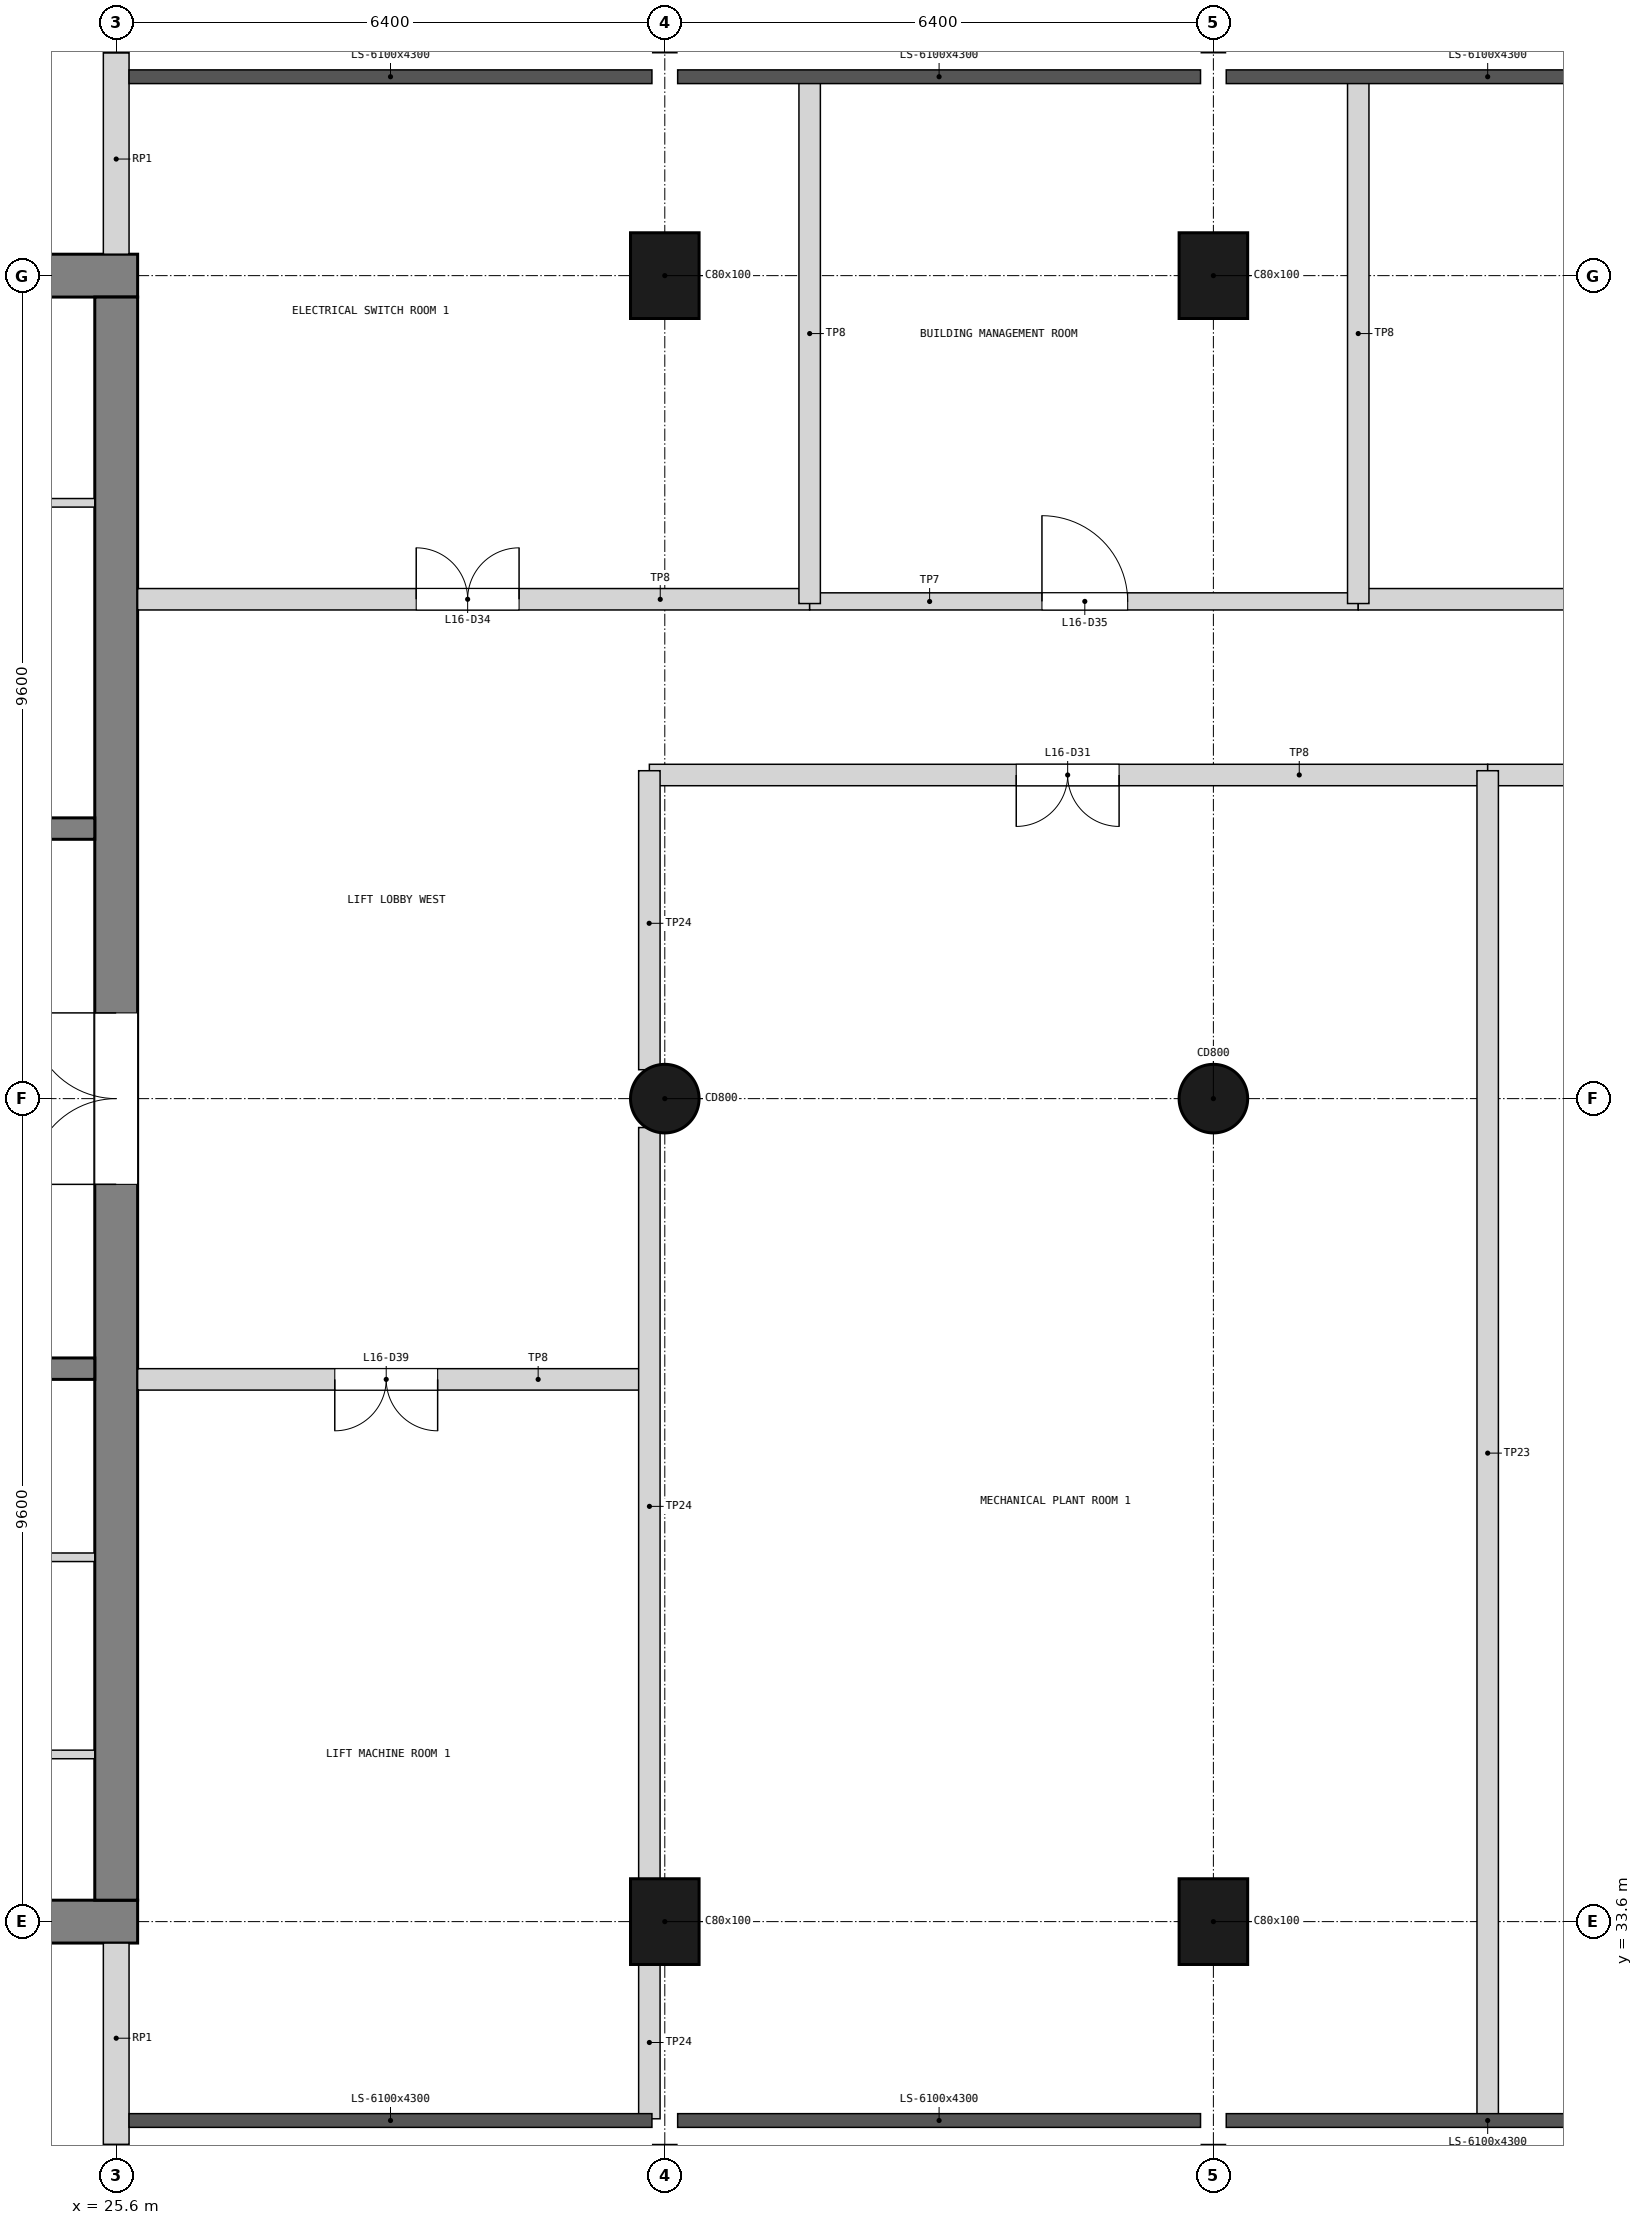
"""IFC4 building model, lengths in metres.
Left out: names, types, materials, properties, quantities, classifications, styles, units other than length and angle.
Written with IfcOpenShell. Run it as: python <this file> out.ifc"""

import sys

from ifc_helpers import new_model, si_unit, direction, frame, frame_2d, origin, origin_2d, place, context, subcontext, project, spatial, rectangle, circle, extrude, element, fill, save


model = new_model("IFC4")
c1 = context("Model", 3, precision=1e-05, world=origin(), true_north=direction((0.0, 1.0)))
c2 = subcontext(c1, "Body", "Model", "MODEL_VIEW")
j1 = project(units=[si_unit("LENGTHUNIT", "METRE"), si_unit("PLANEANGLEUNIT", "RADIAN")], contexts=[c1])
p1 = place(None, origin())
s1 = spatial("IfcSite", under=j1, at=p1, CompositionType="ELEMENT")
p2 = place(p1, origin())
s2 = spatial("IfcBuilding", under=s1, at=p2, CompositionType="ELEMENT")
p3 = place(p2, frame((0.0, 0.0, 64.2)))
s3 = spatial("IfcBuildingStorey", under=s2, at=p3, CompositionType="ELEMENT", Elevation=64.2)
p4 = place(p3, frame((12.55, 52.8, 0.0), z_axis=(0.0, 0.0, 1.0), x_axis=(1.0, 0.0, 0.0)))
e1 = element("IfcWall", 1, at=p4, inside=s3, PredefinedType="SHEAR", context=c2, shape_type="SweptSolid", body=[
    extrude(rectangle(XDim=13.3, YDim=0.5, at=frame_2d((6.65, 0.0))), origin(), (0.0, 0.0, 1.0), 5.1),
])
p5 = place(p4, frame((1.85, 0.0, 1.0)))
e2 = element("IfcOpeningElement", 2, at=p5, cuts=e1, PredefinedType="OPENING", context=c2, shape_type="SweptSolid", body=[
    extrude(rectangle(XDim=0.4, YDim=2.0, at=frame_2d((0.2, 1.0))), frame((0.0, 0.26, 0.0), z_axis=(0.0, -1.0, 0.0), x_axis=(1.0, 0.0, 0.0)), (0.0, 0.0, 1.0), 0.52),
])
p6 = place(p3, frame((12.55, 33.6, 0.0), z_axis=(0.0, 0.0, 1.0), x_axis=(1.0, 0.0, 0.0)))
e3 = element("IfcWall", 3, at=p6, inside=s3, PredefinedType="SHEAR", context=c2, shape_type="SweptSolid", body=[
    extrude(rectangle(XDim=13.3, YDim=0.5, at=frame_2d((6.65, 0.0))), origin(), (0.0, 0.0, 1.0), 5.1),
])
p7 = place(p6, frame((1.85, 0.0, 1.0)))
e4 = element("IfcOpeningElement", 4, at=p7, cuts=e3, PredefinedType="OPENING", context=c2, shape_type="SweptSolid", body=[
    extrude(rectangle(XDim=0.4, YDim=2.0, at=frame_2d((0.2, 1.0))), frame((0.0, 0.26, 0.0), z_axis=(0.0, -1.0, 0.0), x_axis=(1.0, 0.0, 0.0)), (0.0, 0.0, 1.0), 0.52),
])
p8 = place(p3, frame((25.6, 33.85, 0.0), z_axis=(0.0, 0.0, 1.0), x_axis=(0.0, 1.0, 0.0)))
e5 = element("IfcWall", 5, at=p8, inside=s3, PredefinedType="SHEAR", context=c2, shape_type="SweptSolid", body=[
    extrude(rectangle(XDim=18.7, YDim=0.5, at=frame_2d((9.35, 0.0))), origin(), (0.0, 0.0, 1.0), 5.1),
])
p9 = place(p8, frame((8.35, 0.0, 0.0)))
e6 = element("IfcOpeningElement", 6, at=p9, cuts=e5, PredefinedType="OPENING", context=c2, shape_type="SweptSolid", body=[
    extrude(rectangle(XDim=2.0, YDim=2.1, at=frame_2d((1.0, 1.05))), frame((0.0, 0.26, 0.0), z_axis=(0.0, -1.0, 0.0), x_axis=(1.0, 0.0, 0.0)), (0.0, 0.0, 1.0), 0.52),
])
p10 = place(p3, frame((32.0, 33.6, 0.0), z_axis=(0.0, 0.0, 1.0), x_axis=(1.0, 0.0, 0.0)))
e7 = element("IfcColumn", 7, at=p10, inside=s3, PredefinedType="COLUMN", context=c2, shape_type="SweptSolid", body=[
    extrude(rectangle(XDim=0.8, YDim=1.0, at=origin_2d()), origin(), (0.0, 0.0, 1.0), 5.4),
])
p11 = place(p3, frame((32.0, 43.2, 0.0), z_axis=(0.0, 0.0, 1.0), x_axis=(1.0, 0.0, 0.0)))
e8 = element("IfcColumn", 8, at=p11, inside=s3, PredefinedType="COLUMN", context=c2, shape_type="SweptSolid", body=[
    extrude(circle(Radius=0.4, at=origin_2d()), origin(), (0.0, 0.0, 1.0), 5.4),
])
for number, where, z_axis, x_axis in (
    (9, (32.0, 52.8, 0.0), (0.0, 0.0, 1.0), (1.0, 0.0, 0.0)),
    (10, (38.4, 33.6, 0.0), (0.0, 0.0, 1.0), (1.0, 0.0, 0.0)),
):
    element("IfcColumn", number, at=place(p3, frame(where, z_axis=z_axis, x_axis=x_axis)), inside=s3, PredefinedType="COLUMN", context=c2, shape_type="SweptSolid", body=[
        extrude(rectangle(XDim=0.8, YDim=1.0, at=origin_2d()), origin(), (0.0, 0.0, 1.0), 5.4),
    ])
p12 = place(p3, frame((38.4, 43.2, 0.0), z_axis=(0.0, 0.0, 1.0), x_axis=(1.0, 0.0, 0.0)))
e11 = element("IfcColumn", 11, at=p12, inside=s3, PredefinedType="COLUMN", context=c2, shape_type="SweptSolid", body=[
    extrude(circle(Radius=0.4, at=origin_2d()), origin(), (0.0, 0.0, 1.0), 5.4),
])
p13 = place(p3, frame((38.4, 52.8, 0.0), z_axis=(0.0, 0.0, 1.0), x_axis=(1.0, 0.0, 0.0)))
e12 = element("IfcColumn", 12, at=p13, inside=s3, PredefinedType="COLUMN", context=c2, shape_type="SweptSolid", body=[
    extrude(rectangle(XDim=0.8, YDim=1.0, at=origin_2d()), origin(), (0.0, 0.0, 1.0), 5.4),
])
p14 = place(p3, frame((25.6, 31.0, 0.0), z_axis=(0.0, 0.0, 1.0), x_axis=(0.0, 1.0, 0.0)))
e13 = element("IfcWall", 13, at=p14, inside=s3, PredefinedType="SOLIDWALL", context=c2, shape_type="SweptSolid", body=[
    extrude(rectangle(XDim=2.35, YDim=0.3, at=frame_2d((1.175, 0.0))), origin(), (0.0, 0.0, 1.0), 4.3),
])
p15 = place(p3, frame((25.6, 53.05, 0.0), z_axis=(0.0, 0.0, 1.0), x_axis=(0.0, 1.0, 0.0)))
e14 = element("IfcWall", 14, at=p15, inside=s3, PredefinedType="SOLIDWALL", context=c2, shape_type="SweptSolid", body=[
    extrude(rectangle(XDim=2.35, YDim=0.3, at=frame_2d((1.175, 0.0))), origin(), (0.0, 0.0, 1.0), 4.3),
])
for number, where, z_axis, x_axis in (
    (15, (19.875, 40.05, 0.0), (0.0, 0.0, 1.0), (1.0, 0.0, 0.0)),
    (16, (19.875, 46.35, 0.0), (0.0, 0.0, 1.0), (1.0, 0.0, 0.0)),
):
    element("IfcWall", number, at=place(p3, frame(where, z_axis=z_axis, x_axis=x_axis)), inside=s3, PredefinedType="SOLIDWALL", context=c2, shape_type="SweptSolid", body=[
        extrude(rectangle(XDim=5.475, YDim=0.25, at=frame_2d((2.738, 0.0))), origin(), (0.0, 0.0, 1.0), 5.1),
    ])
p16 = place(p3, frame((20.125, 35.55, 0.0), z_axis=(0.0, 0.0, 1.0), x_axis=(1.0, 0.0, 0.0)))
e17 = element("IfcWall", 17, at=p16, inside=s3, PredefinedType="PARTITIONING", context=c2, shape_type="SweptSolid", body=[
    extrude(rectangle(XDim=5.225, YDim=0.1, at=frame_2d((2.613, 0.0))), origin(), (0.0, 0.0, 1.0), 5.1),
])
p17 = place(p3, frame((21.675, 37.85, 0.0), z_axis=(0.0, 0.0, 1.0), x_axis=(1.0, 0.0, 0.0)))
e18 = element("IfcWall", 18, at=p17, inside=s3, PredefinedType="PARTITIONING", context=c2, shape_type="SweptSolid", body=[
    extrude(rectangle(XDim=3.675, YDim=0.1, at=frame_2d((1.837, 0.0))), origin(), (0.0, 0.0, 1.0), 5.1),
])
p18 = place(p3, frame((20.125, 50.15, 0.0), z_axis=(0.0, 0.0, 1.0), x_axis=(1.0, 0.0, 0.0)))
e19 = element("IfcWall", 19, at=p18, inside=s3, PredefinedType="PARTITIONING", context=c2, shape_type="SweptSolid", body=[
    extrude(rectangle(XDim=5.225, YDim=0.1, at=frame_2d((2.613, 0.0))), origin(), (0.0, 0.0, 1.0), 5.1),
])
p19 = place(p3, frame((31.82, 46.975, 0.0), z_axis=(0.0, 0.0, 1.0), x_axis=(1.0, 0.0, 0.0)))
e20 = element("IfcWall", 20, at=p19, inside=s3, PredefinedType="PARTITIONING", context=c2, shape_type="SweptSolid", body=[
    extrude(rectangle(XDim=9.78, YDim=0.25, at=frame_2d((4.89, 0.0))), origin(), (0.0, 0.0, 1.0), 5.1),
])
p20 = place(p19, frame((4.28, 0.0, 0.0)))
e21 = element("IfcOpeningElement", 21, at=p20, cuts=e20, PredefinedType="OPENING", context=c2, shape_type="SweptSolid", body=[
    extrude(rectangle(XDim=1.2, YDim=2.1, at=frame_2d((0.6, 1.05))), frame((0.0, 0.135, 0.0), z_axis=(0.0, -1.0, 0.0), x_axis=(1.0, 0.0, 0.0)), (0.0, 0.0, 1.0), 0.27),
])
p21 = place(p3, frame((41.6, 46.975, 0.0), z_axis=(0.0, 0.0, 1.0), x_axis=(1.0, 0.0, 0.0)))
e22 = element("IfcWall", 22, at=p21, inside=s3, PredefinedType="PARTITIONING", context=c2, shape_type="SweptSolid", body=[
    extrude(rectangle(XDim=6.4, YDim=0.25, at=frame_2d((3.2, 0.0))), origin(), (0.0, 0.0, 1.0), 5.1),
])
p22 = place(p21, frame((2.6, 0.0, 0.0)))
e23 = element("IfcOpeningElement", 23, at=p22, cuts=e22, PredefinedType="OPENING", context=c2, shape_type="SweptSolid", body=[
    extrude(rectangle(XDim=1.2, YDim=2.1, at=frame_2d((0.6, 1.05))), frame((0.0, 0.135, 0.0), z_axis=(0.0, -1.0, 0.0), x_axis=(1.0, 0.0, 0.0)), (0.0, 0.0, 1.0), 0.27),
])
p23 = place(p3, frame((41.6, 31.3, 0.0), z_axis=(0.0, 0.0, 1.0), x_axis=(0.0, 1.0, 0.0)))
e24 = element("IfcWall", 24, at=p23, inside=s3, PredefinedType="PARTITIONING", context=c2, shape_type="SweptSolid", body=[
    extrude(rectangle(XDim=15.725, YDim=0.25, at=frame_2d((7.862, 0.0))), origin(), (0.0, 0.0, 1.0), 4.5),
])
p24 = place(p3, frame((25.85, 49.025, 0.0), z_axis=(0.0, 0.0, 1.0), x_axis=(1.0, 0.0, 0.0)))
e25 = element("IfcWall", 25, at=p24, inside=s3, PredefinedType="PARTITIONING", context=c2, shape_type="SweptSolid", body=[
    extrude(rectangle(XDim=7.84, YDim=0.25, at=frame_2d((3.92, 0.0))), origin(), (0.0, 0.0, 1.0), 5.1),
])
p25 = place(p24, frame((3.25, 0.0, 0.0)))
e26 = element("IfcOpeningElement", 26, at=p25, cuts=e25, PredefinedType="OPENING", context=c2, shape_type="SweptSolid", body=[
    extrude(rectangle(XDim=1.2, YDim=2.1, at=frame_2d((0.6, 1.05))), frame((0.0, 0.135, 0.0), z_axis=(0.0, -1.0, 0.0), x_axis=(1.0, 0.0, 0.0)), (0.0, 0.0, 1.0), 0.27),
])
p26 = place(p3, frame((33.69, 49.0, 0.0), z_axis=(0.0, 0.0, 1.0), x_axis=(1.0, 0.0, 0.0)))
e27 = element("IfcWall", 27, at=p26, inside=s3, PredefinedType="PARTITIONING", context=c2, shape_type="SweptSolid", body=[
    extrude(rectangle(XDim=6.4, YDim=0.2, at=frame_2d((3.2, 0.0))), origin(), (0.0, 0.0, 1.0), 5.1),
])
p27 = place(p26, frame((2.71, 0.0, 0.0)))
e28 = element("IfcOpeningElement", 28, at=p27, cuts=e27, PredefinedType="OPENING", context=c2, shape_type="SweptSolid", body=[
    extrude(rectangle(XDim=1.0, YDim=2.1, at=frame_2d((0.5, 1.05))), frame((0.0, 0.11, 0.0), z_axis=(0.0, -1.0, 0.0), x_axis=(1.0, 0.0, 0.0)), (0.0, 0.0, 1.0), 0.22),
])
p28 = place(p3, frame((40.09, 49.025, 0.0), z_axis=(0.0, 0.0, 1.0), x_axis=(1.0, 0.0, 0.0)))
e29 = element("IfcWall", 29, at=p28, inside=s3, PredefinedType="PARTITIONING", context=c2, shape_type="SweptSolid", body=[
    extrude(rectangle(XDim=9.42, YDim=0.25, at=frame_2d((4.71, 0.0))), origin(), (0.0, 0.0, 1.0), 5.1),
])
p29 = place(p28, frame((4.11, 0.0, 0.0)))
e30 = element("IfcOpeningElement", 30, at=p29, cuts=e29, PredefinedType="OPENING", context=c2, shape_type="SweptSolid", body=[
    extrude(rectangle(XDim=1.2, YDim=2.1, at=frame_2d((0.6, 1.05))), frame((0.0, 0.135, 0.0), z_axis=(0.0, -1.0, 0.0), x_axis=(1.0, 0.0, 0.0)), (0.0, 0.0, 1.0), 0.27),
])
for number, where, z_axis, x_axis in (
    (31, (33.69, 48.975, 0.0), (0.0, 0.0, 1.0), (0.0, 1.0, 0.0)),
    (32, (40.09, 48.975, 0.0), (0.0, 0.0, 1.0), (0.0, 1.0, 0.0)),
):
    element("IfcWall", number, at=place(p3, frame(where, z_axis=z_axis, x_axis=x_axis)), inside=s3, PredefinedType="PARTITIONING", context=c2, shape_type="SweptSolid", body=[
        extrude(rectangle(XDim=6.125, YDim=0.25, at=frame_2d((3.062, 0.0))), origin(), (0.0, 0.0, 1.0), 5.1),
    ])
p30 = place(p3, frame((25.85, 39.925, 0.0), z_axis=(0.0, 0.0, 1.0), x_axis=(1.0, 0.0, 0.0)))
e33 = element("IfcWall", 33, at=p30, inside=s3, PredefinedType="PARTITIONING", context=c2, shape_type="SweptSolid", body=[
    extrude(rectangle(XDim=5.97, YDim=0.25, at=frame_2d((2.985, 0.0))), origin(), (0.0, 0.0, 1.0), 5.1),
])
p31 = place(p30, frame((2.3, 0.0, 0.0)))
e34 = element("IfcOpeningElement", 34, at=p31, cuts=e33, PredefinedType="OPENING", context=c2, shape_type="SweptSolid", body=[
    extrude(rectangle(XDim=1.2, YDim=2.1, at=frame_2d((0.6, 1.05))), frame((0.0, 0.135, 0.0), z_axis=(0.0, -1.0, 0.0), x_axis=(1.0, 0.0, 0.0)), (0.0, 0.0, 1.0), 0.27),
])
p32 = place(p3, frame((31.82, 31.3, 0.0), z_axis=(0.0, 0.0, 1.0), x_axis=(0.0, 1.0, 0.0)))
e35 = element("IfcWall", 35, at=p32, inside=s3, PredefinedType="PARTITIONING", context=c2, shape_type="SweptSolid", body=[
    extrude(rectangle(XDim=1.82, YDim=0.25, at=frame_2d((0.91, 0.0))), origin(), (0.0, 0.0, 1.0), 4.2),
])
p33 = place(p3, frame((31.82, 34.08, 0.0), z_axis=(0.0, 0.0, 1.0), x_axis=(0.0, 1.0, 0.0)))
e36 = element("IfcWall", 36, at=p33, inside=s3, PredefinedType="PARTITIONING", context=c2, shape_type="SweptSolid", body=[
    extrude(rectangle(XDim=8.783, YDim=0.25, at=frame_2d((4.391, 0.0))), origin(), (0.0, 0.0, 1.0), 4.2),
])
p34 = place(p3, frame((31.82, 43.537, 0.0), z_axis=(0.0, 0.0, 1.0), x_axis=(0.0, 1.0, 0.0)))
e37 = element("IfcWall", 37, at=p34, inside=s3, PredefinedType="PARTITIONING", context=c2, shape_type="SweptSolid", body=[
    extrude(rectangle(XDim=3.488, YDim=0.25, at=frame_2d((1.744, 0.0))), origin(), (0.0, 0.0, 1.0), 4.2),
])
p35 = place(p9, origin())
e38 = element("IfcDoor", 38, at=p35, inside=s3, OperationType="DOUBLE_DOOR_SINGLE_SWING", PredefinedType="DOOR", context=c2, shape_type="SweptSolid", body=[
    extrude(rectangle(XDim=2.0, YDim=2.1, at=frame_2d((1.0, 1.05))), frame((0.0, 0.025, 0.0), z_axis=(0.0, -1.0, 0.0), x_axis=(1.0, 0.0, 0.0)), (0.0, 0.0, 1.0), 0.05),
])
fill(e6, e38)
p36 = place(p20, frame((1.2, 0.0, 0.0), z_axis=(0.0, 0.0, 1.0), x_axis=(-1.0, 0.0, 0.0)))
e39 = element("IfcDoor", 39, at=p36, inside=s3, OperationType="DOUBLE_DOOR_SINGLE_SWING", PredefinedType="DOOR", context=c2, shape_type="SweptSolid", body=[
    extrude(rectangle(XDim=1.2, YDim=2.1, at=frame_2d((0.6, 1.05))), frame((0.0, 0.025, 0.0), z_axis=(0.0, -1.0, 0.0), x_axis=(1.0, 0.0, 0.0)), (0.0, 0.0, 1.0), 0.05),
])
fill(e21, e39)
p37 = place(p25, origin())
e40 = element("IfcDoor", 40, at=p37, inside=s3, OperationType="DOUBLE_DOOR_SINGLE_SWING", PredefinedType="DOOR", context=c2, shape_type="SweptSolid", body=[
    extrude(rectangle(XDim=1.2, YDim=2.1, at=frame_2d((0.6, 1.05))), frame((0.0, 0.025, 0.0), z_axis=(0.0, -1.0, 0.0), x_axis=(1.0, 0.0, 0.0)), (0.0, 0.0, 1.0), 0.05),
])
fill(e26, e40)
p38 = place(p27, origin())
e41 = element("IfcDoor", 41, at=p38, inside=s3, OperationType="SINGLE_SWING_LEFT", PredefinedType="DOOR", context=c2, shape_type="SweptSolid", body=[
    extrude(rectangle(XDim=1.0, YDim=2.1, at=frame_2d((0.5, 1.05))), frame((0.0, 0.025, 0.0), z_axis=(0.0, -1.0, 0.0), x_axis=(1.0, 0.0, 0.0)), (0.0, 0.0, 1.0), 0.05),
])
fill(e28, e41)
p39 = place(p31, frame((1.2, 0.0, 0.0), z_axis=(0.0, 0.0, 1.0), x_axis=(-1.0, 0.0, 0.0)))
e42 = element("IfcDoor", 42, at=p39, inside=s3, OperationType="DOUBLE_DOOR_SINGLE_SWING", PredefinedType="DOOR", context=c2, shape_type="SweptSolid", body=[
    extrude(rectangle(XDim=1.2, YDim=2.1, at=frame_2d((0.6, 1.05))), frame((0.0, 0.025, 0.0), z_axis=(0.0, -1.0, 0.0), x_axis=(1.0, 0.0, 0.0)), (0.0, 0.0, 1.0), 0.05),
])
fill(e34, e42)
save(model, sys.argv[1])
